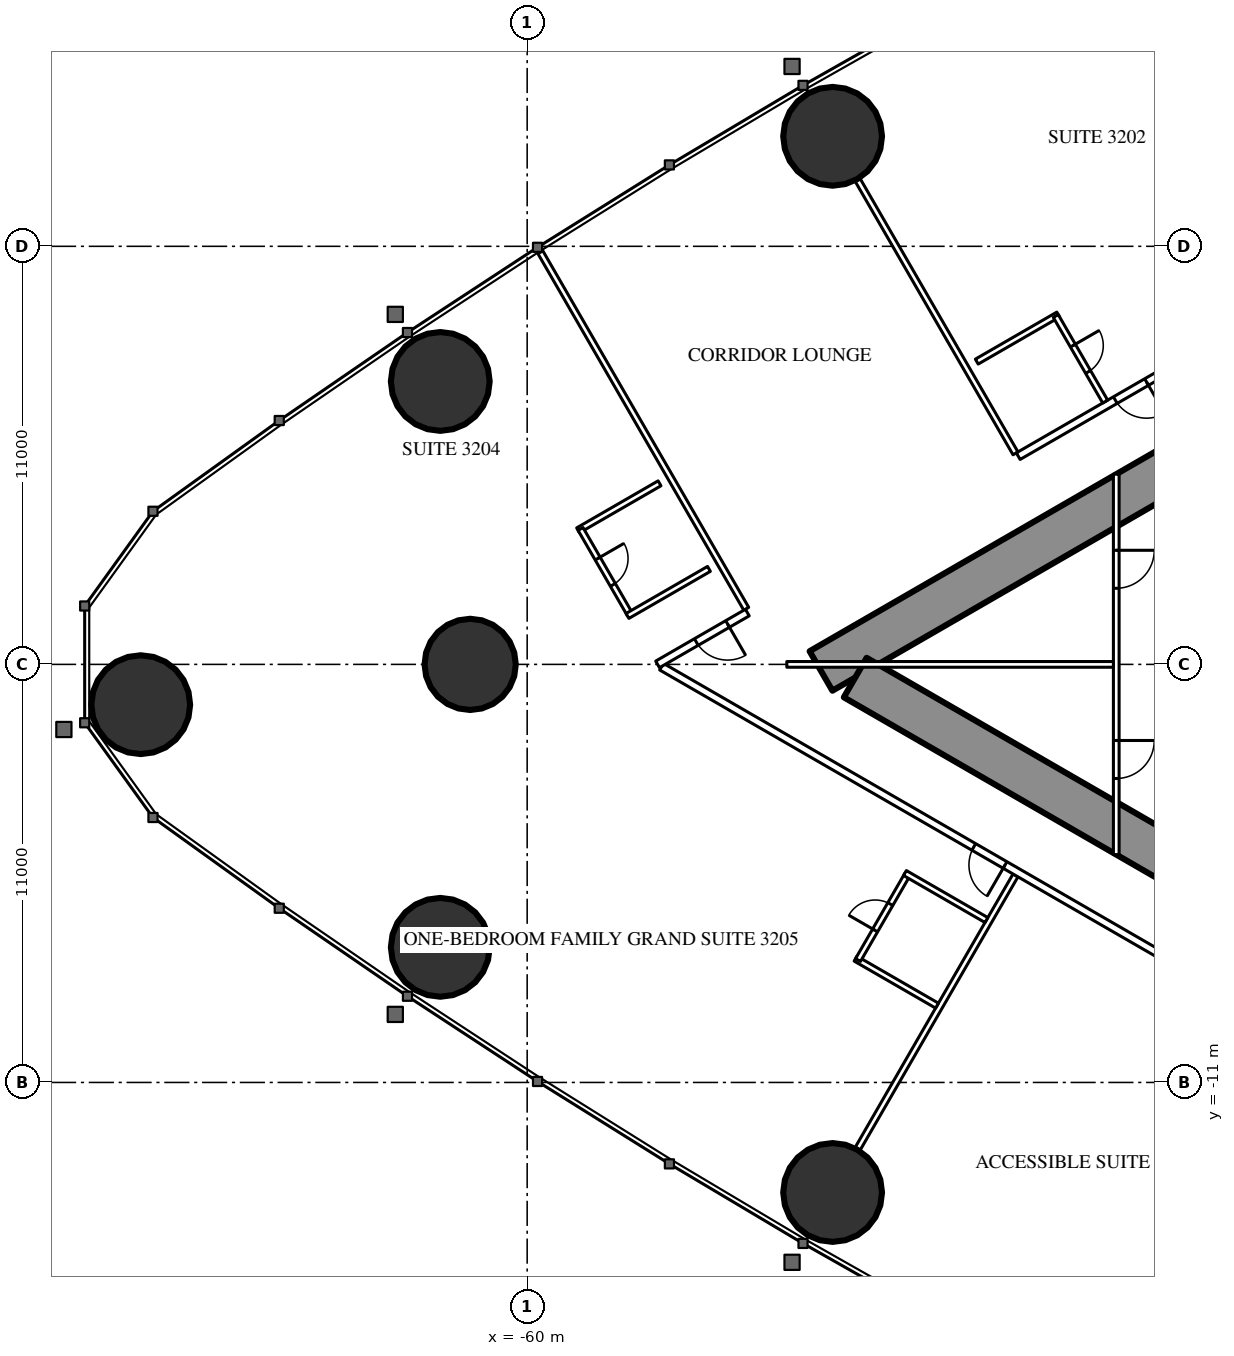
"""IFC4 building model, lengths in metres.
Left out: names, types, materials, properties, quantities, classifications, styles, units other than length and angle.
Written with IfcOpenShell. Run it as: python <this file> out.ifc"""

import sys

from ifc_helpers import new_model, si_unit, direction, frame, frame_2d, origin, origin_2d, place, context, subcontext, project, spatial, rectangle, circle, hollow_circle, extrude, element, fill, save


model = new_model("IFC4")
c1 = context("Model", 3, precision=1e-05, world=origin(), true_north=direction((0.0, 1.0)))
c2 = subcontext(c1, "Body", "Model", "MODEL_VIEW")
j1 = project(units=[si_unit("LENGTHUNIT", "METRE"), si_unit("PLANEANGLEUNIT", "RADIAN")], contexts=[c1])
p1 = place(None, origin())
s1 = spatial("IfcSite", under=j1, at=p1, CompositionType="ELEMENT")
p2 = place(p1, origin())
s2 = spatial("IfcBuilding", under=s1, at=p2, CompositionType="ELEMENT")
p3 = place(p2, frame((0.0, 0.0, 122.1)))
s3 = spatial("IfcBuildingStorey", under=s2, at=p3, CompositionType="ELEMENT", Elevation=122.1)
for number, where, z_axis, x_axis in (
    (1, (-70.168, -1.06, 0.0), (0.0, 0.0, 1.0), (1.0, 0.0, 0.0)),
    (2, (-62.287, -7.445, 0.0), (0.0, 0.0, 1.0), (1.0, 0.0, 0.0)),
    (3, (-51.963, -13.895, 0.0), (0.0, 0.0, 1.0), (1.0, 0.0, 0.0)),
    (4, (-51.963, 13.895, 0.0), (0.0, 0.0, 1.0), (1.0, 0.0, 0.0)),
    (5, (-62.287, 7.445, 0.0), (0.0, 0.0, 1.0), (1.0, 0.0, 0.0)),
):
    element("IfcColumn", number, at=place(p3, frame(where, z_axis=z_axis, x_axis=x_axis)), inside=s3, PredefinedType="COLUMN", context=c2, shape_type="SweptSolid", body=[
        extrude(hollow_circle(Radius=1.3, WallThickness=0.1, at=origin_2d()), origin(), (0.0, 0.0, 1.0), 3.5),
    ])
p4 = place(p3, frame((-61.5, 0.0, 0.0), z_axis=(0.0, 0.0, 1.0), x_axis=(1.0, 0.0, 0.0)))
e6 = element("IfcColumn", 6, at=p4, inside=s3, PredefinedType="COLUMN", context=c2, shape_type="SweptSolid", body=[
    extrude(circle(Radius=1.2, at=origin_2d()), origin(), (0.0, 0.0, 1.0), 3.5),
])
p5 = place(p3, frame((-27.2, 14.3, 0.0), z_axis=(0.0, 0.0, 1.0), x_axis=(-0.866026593062, -0.499997940104, 0.0)))
e7 = element("IfcWall", 7, at=p5, inside=s3, PredefinedType="SHEAR", context=c2, shape_type="SweptSolid", body=[
    extrude(rectangle(XDim=28.946, YDim=1.2, at=frame_2d((14.473, 0.0))), origin(), (0.0, 0.0, 1.0), 3.5),
])
p6 = place(p5, frame((4.6, 0.0, 0.0)))
e8 = element("IfcOpeningElement", 8, at=p6, cuts=e7, PredefinedType="OPENING", context=c2, shape_type="SweptSolid", body=[
    extrude(rectangle(XDim=1.0, YDim=2.2, at=frame_2d((0.5, 1.1))), frame((0.0, 0.61, 0.0), z_axis=(0.0, -1.0, 0.0), x_axis=(1.0, 0.0, 0.0)), (0.0, 0.0, 1.0), 1.22),
])
p7 = place(p5, frame((13.395, 0.0, 0.0)))
e9 = element("IfcOpeningElement", 9, at=p7, cuts=e7, PredefinedType="OPENING", context=c2, shape_type="SweptSolid", body=[
    extrude(rectangle(XDim=1.8, YDim=2.2, at=frame_2d((0.9, 1.1))), frame((0.0, 0.61, 0.0), z_axis=(0.0, -1.0, 0.0), x_axis=(1.0, 0.0, 0.0)), (0.0, 0.0, 1.0), 1.22),
])
p8 = place(p3, frame((-27.2, -14.3, 0.0), z_axis=(0.0, 0.0, 1.0), x_axis=(-0.866024021859, 0.500002393557, 0.0)))
e10 = element("IfcWall", 10, at=p8, inside=s3, PredefinedType="SHEAR", context=c2, shape_type="SweptSolid", body=[
    extrude(rectangle(XDim=27.907, YDim=1.2, at=frame_2d((13.954, 0.0))), origin(), (0.0, 0.0, 1.0), 3.5),
])
p9 = place(p8, frame((4.6, 0.0, 0.0)))
e11 = element("IfcOpeningElement", 11, at=p9, cuts=e10, PredefinedType="OPENING", context=c2, shape_type="SweptSolid", body=[
    extrude(rectangle(XDim=1.0, YDim=2.2, at=frame_2d((0.5, 1.1))), frame((0.0, 0.61, 0.0), z_axis=(0.0, -1.0, 0.0), x_axis=(1.0, 0.0, 0.0)), (0.0, 0.0, 1.0), 1.22),
])
p10 = place(p8, frame((13.395, 0.0, 0.0)))
e12 = element("IfcOpeningElement", 12, at=p10, cuts=e10, PredefinedType="OPENING", context=c2, shape_type="SweptSolid", body=[
    extrude(rectangle(XDim=1.8, YDim=2.2, at=frame_2d((0.9, 1.1))), frame((0.0, 0.61, 0.0), z_axis=(0.0, -1.0, 0.0), x_axis=(1.0, 0.0, 0.0)), (0.0, 0.0, 1.0), 1.22),
])
p11 = place(p3, frame((-47.151, 5.552, 0.0), z_axis=(0.0, 0.0, 1.0), x_axis=(-0.500003012045, 0.866023664773, 0.0)))
e13 = element("IfcWall", 13, at=p11, inside=s3, PredefinedType="PARTITIONING", context=c2, shape_type="SweptSolid", body=[
    extrude(rectangle(XDim=8.311, YDim=0.15, at=frame_2d((4.156, 0.0))), origin(), (0.0, 0.0, 1.0), 2.2),
])
p12 = place(p3, frame((-54.236, 1.462, 0.0), z_axis=(0.0, 0.0, 1.0), x_axis=(-0.499990351854, 0.866030974073, 0.0)))
e14 = element("IfcWall", 14, at=p12, inside=s3, PredefinedType="PARTITIONING", context=c2, shape_type="SweptSolid", body=[
    extrude(rectangle(XDim=10.834, YDim=0.15, at=frame_2d((5.417, 0.0))), origin(), (0.0, 0.0, 1.0), 3.25),
])
p13 = place(p3, frame((-47.151, -5.552, 0.0), z_axis=(0.0, 0.0, 1.0), x_axis=(-0.500003012045, -0.866023664773, 0.0)))
e15 = element("IfcWall", 15, at=p13, inside=s3, PredefinedType="PARTITIONING", context=c2, shape_type="SweptSolid", body=[
    extrude(rectangle(XDim=8.311, YDim=0.15, at=frame_2d((4.156, 0.0))), origin(), (0.0, 0.0, 1.0), 2.2),
])
p14 = place(p3, frame((-36.92, -11.344, 0.0), z_axis=(0.0, 0.0, 1.0), x_axis=(-0.866028313256, 0.499994960614, 0.0)))
e16 = element("IfcWall", 16, at=p14, inside=s3, PredefinedType="PARTITIONING", context=c2, shape_type="SweptSolid", body=[
    extrude(rectangle(XDim=22.568, YDim=0.2, at=frame_2d((11.284, 0.0))), origin(), (0.0, 0.0, 1.0), 3.25),
])
p15 = place(p14, frame((12.131, 0.0, 0.0)))
e17 = element("IfcOpeningElement", 17, at=p15, cuts=e16, PredefinedType="OPENING", context=c2, shape_type="SweptSolid", body=[
    extrude(rectangle(XDim=0.95, YDim=2.2, at=frame_2d((0.475, 1.1))), frame((0.0, 0.11, 0.0), z_axis=(0.0, -1.0, 0.0), x_axis=(1.0, 0.0, 0.0)), (0.0, 0.0, 1.0), 0.22),
])
p16 = place(p14, frame((3.35, 0.0, 0.0)))
e18 = element("IfcOpeningElement", 18, at=p16, cuts=e16, PredefinedType="OPENING", context=c2, shape_type="SweptSolid", body=[
    extrude(rectangle(XDim=1.0, YDim=2.2, at=frame_2d((0.5, 1.1))), frame((0.0, 0.11, 0.0), z_axis=(0.0, -1.0, 0.0), x_axis=(1.0, 0.0, 0.0)), (0.0, 0.0, 1.0), 0.22),
])
p17 = place(p3, frame((-37.7, 10.894, 0.0), z_axis=(0.0, 0.0, 1.0), x_axis=(-0.866027551079, -0.499996280759, 0.0)))
e19 = element("IfcWall", 19, at=p17, inside=s3, PredefinedType="PARTITIONING", context=c2, shape_type="SweptSolid", body=[
    extrude(rectangle(XDim=10.831, YDim=0.2, at=frame_2d((5.415, 0.0))), origin(), (0.0, 0.0, 1.0), 3.25),
])
p18 = place(p17, frame((6.93, 0.0, 0.0)))
e20 = element("IfcOpeningElement", 20, at=p18, cuts=e19, PredefinedType="OPENING", context=c2, shape_type="SweptSolid", body=[
    extrude(rectangle(XDim=0.95, YDim=2.2, at=frame_2d((0.475, 1.1))), frame((0.0, 0.11, 0.0), z_axis=(0.0, -1.0, 0.0), x_axis=(1.0, 0.0, 0.0)), (0.0, 0.0, 1.0), 0.22),
])
p19 = place(p3, frame((-54.207, 1.363, 0.0), z_axis=(0.0, 0.0, 1.0), x_axis=(-0.866046902845, -0.499962760685, 0.0)))
e21 = element("IfcWall", 21, at=p19, inside=s3, PredefinedType="PARTITIONING", context=c2, shape_type="SweptSolid", body=[
    extrude(rectangle(XDim=2.726, YDim=0.2, at=frame_2d((1.363, 0.0))), origin(), (0.0, 0.0, 1.0), 3.25),
])
p20 = place(p19, frame((0.6, 0.0, 0.0)))
e22 = element("IfcOpeningElement", 22, at=p20, cuts=e21, PredefinedType="OPENING", context=c2, shape_type="SweptSolid", body=[
    extrude(rectangle(XDim=0.95, YDim=2.2, at=frame_2d((0.475, 1.1))), frame((0.0, 0.11, 0.0), z_axis=(0.0, -1.0, 0.0), x_axis=(1.0, 0.0, 0.0)), (0.0, 0.0, 1.0), 0.22),
])
p21 = place(p3, frame((-56.517, 4.764, 0.0), z_axis=(0.0, 0.0, 1.0), x_axis=(-0.866031185235, -0.4999899861, 0.0)))
e23 = element("IfcWall", 23, at=p21, inside=s3, PredefinedType="PARTITIONING", context=c2, shape_type="SweptSolid", body=[
    extrude(rectangle(XDim=2.475, YDim=0.15, at=frame_2d((1.238, 0.0))), origin(), (0.0, 0.0, 1.0), 3.25),
])
p22 = place(p3, frame((-57.296, 1.312, 0.0), z_axis=(0.0, 0.0, 1.0), x_axis=(-0.49997716683, 0.86603858612, 0.0)))
e24 = element("IfcWall", 24, at=p22, inside=s3, PredefinedType="PARTITIONING", context=c2, shape_type="SweptSolid", body=[
    extrude(rectangle(XDim=2.6, YDim=0.15, at=frame_2d((1.3, 0.0))), origin(), (0.0, 0.0, 1.0), 3.25),
])
p23 = place(p22, frame((0.9, 0.0, 0.0)))
e25 = element("IfcOpeningElement", 25, at=p23, cuts=e24, PredefinedType="OPENING", context=c2, shape_type="SweptSolid", body=[
    extrude(rectangle(XDim=0.8, YDim=2.2, at=frame_2d((0.4, 1.1))), frame((0.0, 0.085, 0.0), z_axis=(0.0, -1.0, 0.0), x_axis=(1.0, 0.0, 0.0)), (0.0, 0.0, 1.0), 0.17),
])
for number, where, z_axis, x_axis in (
    (26, (-55.217, 2.512, 0.0), (0.0, 0.0, 1.0), (-0.866, -0.5, 0.0)),
    (27, (-49.216, -8.979, 0.0), (0.0, 0.0, 1.0), (-0.866, 0.5, 0.0)),
):
    element("IfcWall", number, at=place(p3, frame(where, z_axis=z_axis, x_axis=x_axis)), inside=s3, PredefinedType="PARTITIONING", context=c2, shape_type="SweptSolid", body=[
        extrude(rectangle(XDim=2.475, YDim=0.15, at=frame_2d((1.238, 0.0))), origin(), (0.0, 0.0, 1.0), 3.25),
    ])
p24 = place(p3, frame((-49.995, -5.527, 0.0), z_axis=(0.0, 0.0, 1.0), x_axis=(-0.500006934395, -0.866021400173, 0.0)))
e28 = element("IfcWall", 28, at=p24, inside=s3, PredefinedType="PARTITIONING", context=c2, shape_type="SweptSolid", body=[
    extrude(rectangle(XDim=2.6, YDim=0.15, at=frame_2d((1.3, 0.0))), origin(), (0.0, 0.0, 1.0), 3.25),
])
p25 = place(p24, frame((0.9, 0.0, 0.0)))
e29 = element("IfcOpeningElement", 29, at=p25, cuts=e28, PredefinedType="OPENING", context=c2, shape_type="SweptSolid", body=[
    extrude(rectangle(XDim=0.8, YDim=2.2, at=frame_2d((0.4, 1.1))), frame((0.0, 0.085, 0.0), z_axis=(0.0, -1.0, 0.0), x_axis=(1.0, 0.0, 0.0)), (0.0, 0.0, 1.0), 0.17),
])
p26 = place(p3, frame((-47.916, -6.727, 0.0), z_axis=(0.0, 0.0, 1.0), x_axis=(-0.866031185235, 0.4999899861, 0.0)))
e30 = element("IfcWall", 30, at=p26, inside=s3, PredefinedType="PARTITIONING", context=c2, shape_type="SweptSolid", body=[
    extrude(rectangle(XDim=2.475, YDim=0.15, at=frame_2d((1.238, 0.0))), origin(), (0.0, 0.0, 1.0), 3.25),
])
p27 = place(p3, frame((-46.026, 9.204, 0.0), z_axis=(0.0, 0.0, 1.0), x_axis=(-0.866006523861, -0.500032699561, 0.0)))
e31 = element("IfcWall", 31, at=p27, inside=s3, PredefinedType="PARTITIONING", context=c2, shape_type="SweptSolid", body=[
    extrude(rectangle(XDim=2.475, YDim=0.15, at=frame_2d((1.237, 0.0))), origin(), (0.0, 0.0, 1.0), 3.25),
])
p28 = place(p3, frame((-44.791, 6.915, 0.0), z_axis=(0.0, 0.0, 1.0), x_axis=(-0.500047596559, 0.865997922154, 0.0)))
e32 = element("IfcWall", 32, at=p28, inside=s3, PredefinedType="PARTITIONING", context=c2, shape_type="SweptSolid", body=[
    extrude(rectangle(XDim=2.6, YDim=0.15, at=frame_2d((1.3, 0.0))), origin(), (0.0, 0.0, 1.0), 3.25),
])
p29 = place(p28, frame((0.9, 0.0, 0.0)))
e33 = element("IfcOpeningElement", 33, at=p29, cuts=e32, PredefinedType="OPENING", context=c2, shape_type="SweptSolid", body=[
    extrude(rectangle(XDim=0.8, YDim=2.2, at=frame_2d((0.4, 1.1))), frame((0.0, 0.085, 0.0), z_axis=(0.0, -1.0, 0.0), x_axis=(1.0, 0.0, 0.0)), (0.0, 0.0, 1.0), 0.17),
])
p30 = place(p3, frame((-44.5, 5.005, 0.0), z_axis=(0.0, 0.0, 1.0), x_axis=(0.0, -1.0, 0.0)))
e34 = element("IfcWall", 34, at=p30, inside=s3, PredefinedType="PARTITIONING", context=c2, shape_type="SweptSolid", body=[
    extrude(rectangle(XDim=10.009, YDim=0.15, at=frame_2d((5.005, 0.0))), origin(), (0.0, 0.0, 1.0), 2.45),
])
p31 = place(p30, frame((2.002, 0.0, 0.0)))
e35 = element("IfcOpeningElement", 35, at=p31, cuts=e34, PredefinedType="OPENING", context=c2, shape_type="SweptSolid", body=[
    extrude(rectangle(XDim=1.0, YDim=2.2, at=frame_2d((0.5, 1.1))), frame((0.0, 0.085, 0.0), z_axis=(0.0, -1.0, 0.0), x_axis=(1.0, 0.0, 0.0)), (0.0, 0.0, 1.0), 0.17),
])
p32 = place(p30, frame((7.007, 0.0, 0.0)))
e36 = element("IfcOpeningElement", 36, at=p32, cuts=e34, PredefinedType="OPENING", context=c2, shape_type="SweptSolid", body=[
    extrude(rectangle(XDim=1.0, YDim=2.2, at=frame_2d((0.5, 1.1))), frame((0.0, 0.085, 0.0), z_axis=(0.0, -1.0, 0.0), x_axis=(1.0, 0.0, 0.0)), (0.0, 0.0, 1.0), 0.17),
])
p33 = place(p3, frame((-44.575, 0.0, 0.0), z_axis=(0.0, 0.0, 1.0), x_axis=(-1.0, 0.0, 0.0)))
e37 = element("IfcWall", 37, at=p33, inside=s3, PredefinedType="PARTITIONING", context=c2, shape_type="SweptSolid", body=[
    extrude(rectangle(XDim=8.593, YDim=0.15, at=frame_2d((4.297, 0.0))), origin(), (0.0, 0.0, 1.0), 2.2),
])
p34 = place(p23, origin())
e38 = element("IfcDoor", 38, at=p34, inside=s3, OperationType="SINGLE_SWING_RIGHT", PredefinedType="DOOR", context=c2, shape_type="SweptSolid", body=[
    extrude(rectangle(XDim=0.8, YDim=2.2, at=frame_2d((0.4, 1.1))), frame((0.0, 0.025, 0.0), z_axis=(0.0, -1.0, 0.0), x_axis=(1.0, 0.0, 0.0)), (0.0, 0.0, 1.0), 0.05),
])
fill(e25, e38)
p35 = place(p20, origin())
e39 = element("IfcDoor", 39, at=p35, inside=s3, OperationType="SINGLE_SWING_LEFT", PredefinedType="DOOR", context=c2, shape_type="SweptSolid", body=[
    extrude(rectangle(XDim=0.95, YDim=2.2, at=frame_2d((0.475, 1.1))), frame((0.0, 0.025, 0.0), z_axis=(0.0, -1.0, 0.0), x_axis=(1.0, 0.0, 0.0)), (0.0, 0.0, 1.0), 0.05),
])
fill(e22, e39)
p36 = place(p25, origin())
e40 = element("IfcDoor", 40, at=p36, inside=s3, OperationType="SINGLE_SWING_RIGHT", PredefinedType="DOOR", context=c2, shape_type="SweptSolid", body=[
    extrude(rectangle(XDim=0.8, YDim=2.2, at=frame_2d((0.4, 1.1))), frame((0.0, 0.025, 0.0), z_axis=(0.0, -1.0, 0.0), x_axis=(1.0, 0.0, 0.0)), (0.0, 0.0, 1.0), 0.05),
])
fill(e29, e40)
p37 = place(p15, origin())
e41 = element("IfcDoor", 41, at=p37, inside=s3, OperationType="SINGLE_SWING_LEFT", PredefinedType="DOOR", context=c2, shape_type="SweptSolid", body=[
    extrude(rectangle(XDim=0.95, YDim=2.2, at=frame_2d((0.475, 1.1))), frame((0.0, 0.025, 0.0), z_axis=(0.0, -1.0, 0.0), x_axis=(1.0, 0.0, 0.0)), (0.0, 0.0, 1.0), 0.05),
])
fill(e17, e41)
p38 = place(p29, origin())
e42 = element("IfcDoor", 42, at=p38, inside=s3, OperationType="SINGLE_SWING_RIGHT", PredefinedType="DOOR", context=c2, shape_type="SweptSolid", body=[
    extrude(rectangle(XDim=0.8, YDim=2.2, at=frame_2d((0.4, 1.1))), frame((0.0, 0.025, 0.0), z_axis=(0.0, -1.0, 0.0), x_axis=(1.0, 0.0, 0.0)), (0.0, 0.0, 1.0), 0.05),
])
fill(e33, e42)
p39 = place(p18, origin())
e43 = element("IfcDoor", 43, at=p39, inside=s3, OperationType="SINGLE_SWING_LEFT", PredefinedType="DOOR", context=c2, shape_type="SweptSolid", body=[
    extrude(rectangle(XDim=0.95, YDim=2.2, at=frame_2d((0.475, 1.1))), frame((0.0, 0.025, 0.0), z_axis=(0.0, -1.0, 0.0), x_axis=(1.0, 0.0, 0.0)), (0.0, 0.0, 1.0), 0.05),
])
fill(e20, e43)
p40 = place(p31, origin())
e44 = element("IfcDoor", 44, at=p40, inside=s3, OperationType="SINGLE_SWING_LEFT", PredefinedType="DOOR", context=c2, shape_type="SweptSolid", body=[
    extrude(rectangle(XDim=1.0, YDim=2.2, at=frame_2d((0.5, 1.1))), frame((0.0, 0.025, 0.0), z_axis=(0.0, -1.0, 0.0), x_axis=(1.0, 0.0, 0.0)), (0.0, 0.0, 1.0), 0.05),
])
fill(e35, e44)
p41 = place(p32, origin())
e45 = element("IfcDoor", 45, at=p41, inside=s3, OperationType="SINGLE_SWING_LEFT", PredefinedType="DOOR", context=c2, shape_type="SweptSolid", body=[
    extrude(rectangle(XDim=1.0, YDim=2.2, at=frame_2d((0.5, 1.1))), frame((0.0, 0.025, 0.0), z_axis=(0.0, -1.0, 0.0), x_axis=(1.0, 0.0, 0.0)), (0.0, 0.0, 1.0), 0.05),
])
fill(e36, e45)
save(model, sys.argv[1])
